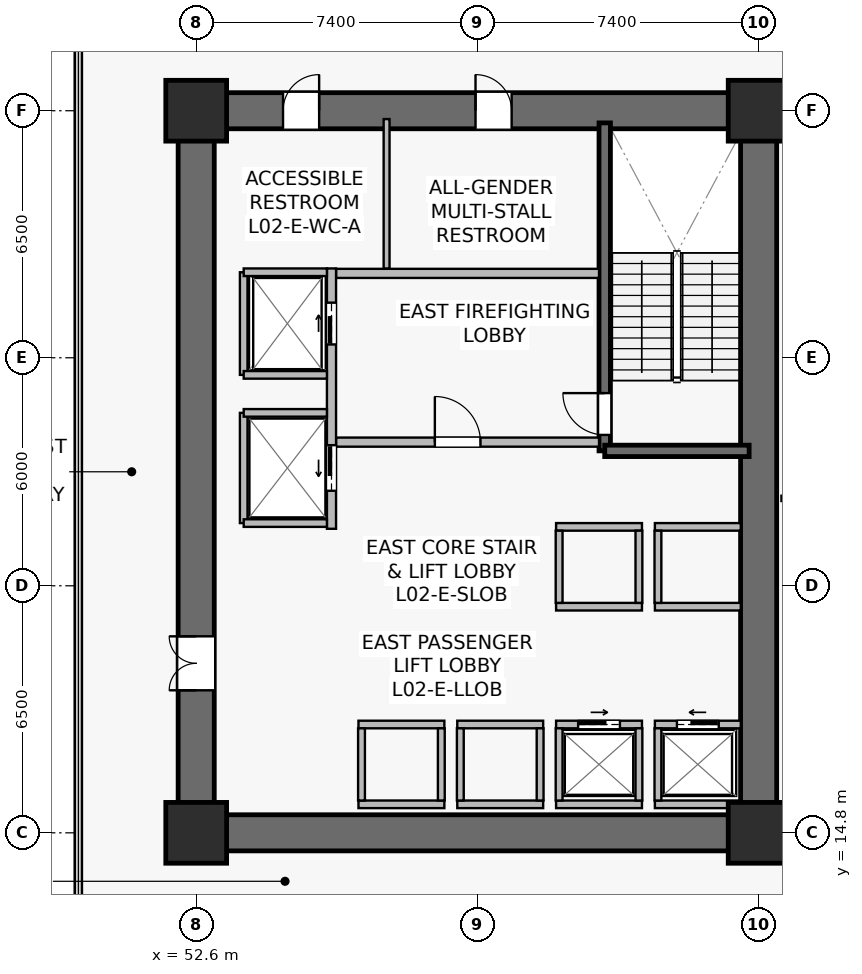
"""IFC4 building model, lengths in metres.
Left out: names, types, materials, properties, quantities, classifications, styles, units other than length and angle.
Written with IfcOpenShell. Run it as: python <this file> out.ifc"""

import sys

from ifc_helpers import new_model, si_unit, direction, frame, frame_2d, origin, origin_2d, place, context, subcontext, project, spatial, rectangle, extrude, source, transform, mapped, element, fill, save


model = new_model("IFC4")
c1 = context("Model", 3, precision=1e-05, world=origin(), true_north=direction((0.0, 1.0)))
c2 = subcontext(c1, "Body", "Model", "MODEL_VIEW")
j1 = project(units=[si_unit("LENGTHUNIT", "METRE"), si_unit("PLANEANGLEUNIT", "RADIAN")], contexts=[c1])
p1 = place(None, origin())
s1 = spatial("IfcSite", under=j1, at=p1, CompositionType="ELEMENT")
p2 = place(p1, origin())
s2 = spatial("IfcBuilding", under=s1, at=p2, CompositionType="ELEMENT")
p3 = place(p2, frame((0.0, 0.0, 5.4)))
s3 = spatial("IfcBuildingStorey", under=s2, at=p3, CompositionType="ELEMENT", Elevation=5.4)
p4 = place(p3, frame((52.125, 14.8, 0.0), z_axis=(0.0, 0.0, 1.0), x_axis=(1.0, 0.0, 0.0)))
e1 = element("IfcWall", 1, at=p4, inside=s3, PredefinedType="SHEAR", context=c2, shape_type="SweptSolid", body=[
    extrude(rectangle(XDim=15.75, YDim=0.95, at=frame_2d((7.875, 0.0))), origin(), (0.0, 0.0, 1.0), 4.45),
])
p5 = place(p3, frame((52.125, 33.8, 0.0), z_axis=(0.0, 0.0, 1.0), x_axis=(1.0, 0.0, 0.0)))
e2 = element("IfcWall", 2, at=p5, inside=s3, PredefinedType="SHEAR", context=c2, shape_type="SweptSolid", body=[
    extrude(rectangle(XDim=15.75, YDim=0.95, at=frame_2d((7.875, 0.0))), origin(), (0.0, 0.0, 1.0), 4.45),
])
p6 = place(p5, frame((7.825, 0.0, 0.0)))
e3 = element("IfcOpeningElement", 3, at=p6, cuts=e2, PredefinedType="OPENING", context=c2, shape_type="SweptSolid", body=[
    extrude(rectangle(XDim=0.95, YDim=2.15, at=frame_2d((0.475, 1.075))), frame((0.0, 0.485, 0.0), z_axis=(0.0, -1.0, 0.0), x_axis=(1.0, 0.0, 0.0)), (0.0, 0.0, 1.0), 0.97),
])
p7 = place(p5, frame((2.76, 0.0, 0.0)))
e4 = element("IfcOpeningElement", 4, at=p7, cuts=e2, PredefinedType="OPENING", context=c2, shape_type="SweptSolid", body=[
    extrude(rectangle(XDim=0.95, YDim=2.15, at=frame_2d((0.475, 1.075))), frame((0.0, 0.485, 0.0), z_axis=(0.0, -1.0, 0.0), x_axis=(1.0, 0.0, 0.0)), (0.0, 0.0, 1.0), 0.97),
])
p8 = place(p3, frame((52.6, 15.275, 0.0), z_axis=(0.0, 0.0, 1.0), x_axis=(0.0, 1.0, 0.0)))
e5 = element("IfcWall", 5, at=p8, inside=s3, PredefinedType="SHEAR", context=c2, shape_type="SweptSolid", body=[
    extrude(rectangle(XDim=18.05, YDim=0.95, at=frame_2d((9.025, 0.0))), origin(), (0.0, 0.0, 1.0), 4.45),
])
p9 = place(p8, frame((3.275, 0.0, 0.0)))
e6 = element("IfcOpeningElement", 6, at=p9, cuts=e5, PredefinedType="OPENING", context=c2, shape_type="SweptSolid", body=[
    extrude(rectangle(XDim=1.42, YDim=2.2, at=frame_2d((0.71, 1.1))), frame((0.0, 0.485, 0.0), z_axis=(0.0, -1.0, 0.0), x_axis=(1.0, 0.0, 0.0)), (0.0, 0.0, 1.0), 0.97),
])
p10 = place(p3, frame((67.4, 15.275, 0.0), z_axis=(0.0, 0.0, 1.0), x_axis=(0.0, 1.0, 0.0)))
e7 = element("IfcWall", 7, at=p10, inside=s3, PredefinedType="SHEAR", context=c2, shape_type="SweptSolid", body=[
    extrude(rectangle(XDim=18.05, YDim=0.95, at=frame_2d((9.025, 0.0))), origin(), (0.0, 0.0, 1.0), 4.45),
])
p11 = place(p3, frame((63.35, 24.85, 0.0), z_axis=(0.0, 0.0, 1.0), x_axis=(0.0, 1.0, 0.0)))
e8 = element("IfcWall", 8, at=p11, inside=s3, PredefinedType="SHEAR", context=c2, shape_type="SweptSolid", body=[
    extrude(rectangle(XDim=8.63, YDim=0.3, at=frame_2d((4.315, 0.0))), origin(), (0.0, 0.0, 1.0), 4.45),
])
p12 = place(p11, frame((0.42, 0.0, 0.0)))
e9 = element("IfcOpeningElement", 9, at=p12, cuts=e8, PredefinedType="OPENING", context=c2, shape_type="SweptSolid", body=[
    extrude(rectangle(XDim=1.1, YDim=2.15, at=frame_2d((0.55, 1.075))), frame((0.0, 0.16, 0.0), z_axis=(0.0, -1.0, 0.0), x_axis=(1.0, 0.0, 0.0)), (0.0, 0.0, 1.0), 0.32),
])
p13 = place(p3, frame((63.35, 24.85, 0.0), z_axis=(0.0, 0.0, 1.0), x_axis=(1.0, 0.0, 0.0)))
e10 = element("IfcWall", 10, at=p13, inside=s3, PredefinedType="SHEAR", context=c2, shape_type="SweptSolid", body=[
    extrude(rectangle(XDim=3.8, YDim=0.3, at=frame_2d((1.9, 0.0))), origin(), (0.0, 0.0, 1.0), 4.45),
])
m1 = source(origin(), c2, "Body", "SweptSolid", [
    extrude(rectangle(XDim=1.6, YDim=1.6, at=origin_2d()), origin(), (0.0, 0.0, 1.0), 4.8),
])
for number, where, z_axis, x_axis in (
    (11, (52.6, 14.8, 0.0), (0.0, 0.0, 1.0), (1.0, 0.0, 0.0)),
    (12, (67.4, 14.8, 0.0), (0.0, 0.0, 1.0), (1.0, 0.0, 0.0)),
    (13, (52.6, 33.8, 0.0), (0.0, 0.0, 1.0), (1.0, 0.0, 0.0)),
    (14, (67.4, 33.8, 0.0), (0.0, 0.0, 1.0), (1.0, 0.0, 0.0)),
):
    element("IfcColumn", number, at=place(p3, frame(where, z_axis=z_axis, x_axis=x_axis)), inside=s3, PredefinedType="COLUMN", context=c2, shape_type="MappedRepresentation", body=[
        mapped(m1, transform((0.0, 0.0, 0.0), scale=1.0)),
    ])
p14 = place(p3, frame((56.28, 25.08, 0.0), z_axis=(0.0, 0.0, 1.0), x_axis=(1.0, 0.0, 0.0)))
e15 = element("IfcWall", 15, at=p14, inside=s3, PredefinedType="SOLIDWALL", context=c2, shape_type="SweptSolid", body=[
    extrude(rectangle(XDim=6.92, YDim=0.24, at=frame_2d((3.46, 0.0))), origin(), (0.0, 0.0, 1.0), 3.735),
])
p15 = place(p14, frame((2.6, 0.0, 0.0)))
e16 = element("IfcOpeningElement", 16, at=p15, cuts=e15, PredefinedType="OPENING", context=c2, shape_type="SweptSolid", body=[
    extrude(rectangle(XDim=1.2, YDim=2.16, at=frame_2d((0.6, 1.08))), frame((0.0, 0.13, 0.0), z_axis=(0.0, -1.0, 0.0), x_axis=(1.0, 0.0, 0.0)), (0.0, 0.0, 1.0), 0.26),
])
p16 = place(p3, frame((56.28, 29.52, 0.0), z_axis=(0.0, 0.0, 1.0), x_axis=(1.0, 0.0, 0.0)))
e17 = element("IfcWall", 17, at=p16, inside=s3, PredefinedType="SOLIDWALL", context=c2, shape_type="SweptSolid", body=[
    extrude(rectangle(XDim=6.92, YDim=0.24, at=frame_2d((3.46, 0.0))), origin(), (0.0, 0.0, 1.0), 3.735),
])
p17 = place(p3, frame((56.16, 22.8, 0.0), z_axis=(0.0, 0.0, 1.0), x_axis=(0.0, 1.0, 0.0)))
e18 = element("IfcWall", 18, at=p17, inside=s3, PredefinedType="SOLIDWALL", context=c2, shape_type="SweptSolid", body=[
    extrude(rectangle(XDim=6.85, YDim=0.24, at=frame_2d((3.425, 0.0))), origin(), (0.0, 0.0, 1.0), 3.535),
])
p18 = place(p17, frame((4.85, 0.0, 0.0)))
e19 = element("IfcOpeningElement", 19, at=p18, cuts=e18, PredefinedType="OPENING", context=c2, shape_type="SweptSolid", body=[
    extrude(rectangle(XDim=1.1, YDim=2.22, at=frame_2d((0.55, 1.11))), frame((0.0, 0.13, 0.0), z_axis=(0.0, -1.0, 0.0), x_axis=(1.0, 0.0, 0.0)), (0.0, 0.0, 1.0), 0.26),
])
p19 = place(p17, frame((1.0, 0.0, 0.0)))
e20 = element("IfcOpeningElement", 20, at=p19, cuts=e18, PredefinedType="OPENING", context=c2, shape_type="SweptSolid", body=[
    extrude(rectangle(XDim=1.2, YDim=2.22, at=frame_2d((0.6, 1.11))), frame((0.0, 0.13, 0.0), z_axis=(0.0, -1.0, 0.0), x_axis=(1.0, 0.0, 0.0)), (0.0, 0.0, 1.0), 0.26),
])
p20 = place(p3, frame((64.67, 17.65, 0.0), z_axis=(0.0, 0.0, 1.0), x_axis=(1.0, 0.0, 0.0)))
e21 = element("IfcWall", 21, at=p20, inside=s3, PredefinedType="SOLIDWALL", context=c2, shape_type="SweptSolid", body=[
    extrude(rectangle(XDim=2.26, YDim=0.2, at=frame_2d((1.13, 0.0))), origin(), (0.0, 0.0, 1.0), 4.45),
])
p21 = place(p20, frame((0.58, 0.0, 0.0)))
e22 = element("IfcOpeningElement", 22, at=p21, cuts=e21, PredefinedType="OPENING", context=c2, shape_type="SweptSolid", body=[
    extrude(rectangle(XDim=1.1, YDim=2.22, at=frame_2d((0.55, 1.11))), frame((0.0, 0.11, 0.0), z_axis=(0.0, -1.0, 0.0), x_axis=(1.0, 0.0, 0.0)), (0.0, 0.0, 1.0), 0.22),
])
p22 = place(p3, frame((64.67, 15.55, 0.0), z_axis=(0.0, 0.0, 1.0), x_axis=(1.0, 0.0, 0.0)))
e23 = element("IfcWall", 23, at=p22, inside=s3, PredefinedType="SOLIDWALL", context=c2, shape_type="SweptSolid", body=[
    extrude(rectangle(XDim=2.26, YDim=0.2, at=frame_2d((1.13, 0.0))), origin(), (0.0, 0.0, 1.0), 4.45),
])
p23 = place(p3, frame((64.75, 15.65, 0.0), z_axis=(0.0, 0.0, 1.0), x_axis=(0.0, 1.0, 0.0)))
e24 = element("IfcWall", 24, at=p23, inside=s3, PredefinedType="SOLIDWALL", context=c2, shape_type="SweptSolid", body=[
    extrude(rectangle(XDim=1.9, YDim=0.18, at=frame_2d((0.95, 0.0))), origin(), (0.0, 0.0, 1.0), 4.45),
])
p24 = place(p3, frame((62.07, 17.65, 0.0), z_axis=(0.0, 0.0, 1.0), x_axis=(1.0, 0.0, 0.0)))
e25 = element("IfcWall", 25, at=p24, inside=s3, PredefinedType="SOLIDWALL", context=c2, shape_type="SweptSolid", body=[
    extrude(rectangle(XDim=2.26, YDim=0.2, at=frame_2d((1.13, 0.0))), origin(), (0.0, 0.0, 1.0), 4.45),
])
p25 = place(p24, frame((0.58, 0.0, 0.0)))
e26 = element("IfcOpeningElement", 26, at=p25, cuts=e25, PredefinedType="OPENING", context=c2, shape_type="SweptSolid", body=[
    extrude(rectangle(XDim=1.1, YDim=2.22, at=frame_2d((0.55, 1.11))), frame((0.0, 0.11, 0.0), z_axis=(0.0, -1.0, 0.0), x_axis=(1.0, 0.0, 0.0)), (0.0, 0.0, 1.0), 0.22),
])
p26 = place(p3, frame((62.07, 15.55, 0.0), z_axis=(0.0, 0.0, 1.0), x_axis=(1.0, 0.0, 0.0)))
e27 = element("IfcWall", 27, at=p26, inside=s3, PredefinedType="SOLIDWALL", context=c2, shape_type="SweptSolid", body=[
    extrude(rectangle(XDim=2.26, YDim=0.2, at=frame_2d((1.13, 0.0))), origin(), (0.0, 0.0, 1.0), 4.45),
])
for number, where, z_axis, x_axis in (
    (28, (62.15, 15.65, 0.0), (0.0, 0.0, 1.0), (0.0, 1.0, 0.0)),
    (29, (64.25, 15.65, 0.0), (0.0, 0.0, 1.0), (0.0, 1.0, 0.0)),
):
    element("IfcWall", number, at=place(p3, frame(where, z_axis=z_axis, x_axis=x_axis)), inside=s3, PredefinedType="SOLIDWALL", context=c2, shape_type="SweptSolid", body=[
        extrude(rectangle(XDim=1.9, YDim=0.18, at=frame_2d((0.95, 0.0))), origin(), (0.0, 0.0, 1.0), 4.45),
    ])
for number, where, z_axis, x_axis in (
    (30, (59.47, 17.65, 0.0), (0.0, 0.0, 1.0), (1.0, 0.0, 0.0)),
    (31, (59.47, 15.55, 0.0), (0.0, 0.0, 1.0), (1.0, 0.0, 0.0)),
):
    element("IfcWall", number, at=place(p3, frame(where, z_axis=z_axis, x_axis=x_axis)), inside=s3, PredefinedType="SOLIDWALL", context=c2, shape_type="SweptSolid", body=[
        extrude(rectangle(XDim=2.26, YDim=0.2, at=frame_2d((1.13, 0.0))), origin(), (0.0, 0.0, 1.0), 3.735),
    ])
for number, where, z_axis, x_axis in (
    (32, (59.55, 15.65, 0.0), (0.0, 0.0, 1.0), (0.0, 1.0, 0.0)),
    (33, (61.65, 15.65, 0.0), (0.0, 0.0, 1.0), (0.0, 1.0, 0.0)),
):
    element("IfcWall", number, at=place(p3, frame(where, z_axis=z_axis, x_axis=x_axis)), inside=s3, PredefinedType="SOLIDWALL", context=c2, shape_type="SweptSolid", body=[
        extrude(rectangle(XDim=1.9, YDim=0.18, at=frame_2d((0.95, 0.0))), origin(), (0.0, 0.0, 1.0), 4.45),
    ])
for number, where, z_axis, x_axis in (
    (34, (56.87, 17.65, 0.0), (0.0, 0.0, 1.0), (1.0, 0.0, 0.0)),
    (35, (56.87, 15.55, 0.0), (0.0, 0.0, 1.0), (1.0, 0.0, 0.0)),
):
    element("IfcWall", number, at=place(p3, frame(where, z_axis=z_axis, x_axis=x_axis)), inside=s3, PredefinedType="SOLIDWALL", context=c2, shape_type="SweptSolid", body=[
        extrude(rectangle(XDim=2.26, YDim=0.2, at=frame_2d((1.13, 0.0))), origin(), (0.0, 0.0, 1.0), 4.45),
    ])
for number, where, z_axis, x_axis in (
    (36, (56.95, 15.65, 0.0), (0.0, 0.0, 1.0), (0.0, 1.0, 0.0)),
    (37, (59.05, 15.65, 0.0), (0.0, 0.0, 1.0), (0.0, 1.0, 0.0)),
):
    element("IfcWall", number, at=place(p3, frame(where, z_axis=z_axis, x_axis=x_axis)), inside=s3, PredefinedType="SOLIDWALL", context=c2, shape_type="SweptSolid", body=[
        extrude(rectangle(XDim=1.9, YDim=0.18, at=frame_2d((0.95, 0.0))), origin(), (0.0, 0.0, 1.0), 4.45),
    ])
for number, where, z_axis, x_axis in (
    (38, (64.67, 20.75, 0.0), (0.0, 0.0, 1.0), (1.0, 0.0, 0.0)),
    (39, (64.67, 22.85, 0.0), (0.0, 0.0, 1.0), (1.0, 0.0, 0.0)),
):
    element("IfcWall", number, at=place(p3, frame(where, z_axis=z_axis, x_axis=x_axis)), inside=s3, PredefinedType="SOLIDWALL", context=c2, shape_type="SweptSolid", body=[
        extrude(rectangle(XDim=2.26, YDim=0.2, at=frame_2d((1.13, 0.0))), origin(), (0.0, 0.0, 1.0), 4.45),
    ])
p27 = place(p3, frame((64.75, 20.85, 0.0), z_axis=(0.0, 0.0, 1.0), x_axis=(0.0, 1.0, 0.0)))
e40 = element("IfcWall", 40, at=p27, inside=s3, PredefinedType="SOLIDWALL", context=c2, shape_type="SweptSolid", body=[
    extrude(rectangle(XDim=1.9, YDim=0.18, at=frame_2d((0.95, 0.0))), origin(), (0.0, 0.0, 1.0), 4.45),
])
for number, where, z_axis, x_axis in (
    (41, (62.07, 20.75, 0.0), (0.0, 0.0, 1.0), (1.0, 0.0, 0.0)),
    (42, (62.07, 22.85, 0.0), (0.0, 0.0, 1.0), (1.0, 0.0, 0.0)),
):
    element("IfcWall", number, at=place(p3, frame(where, z_axis=z_axis, x_axis=x_axis)), inside=s3, PredefinedType="SOLIDWALL", context=c2, shape_type="SweptSolid", body=[
        extrude(rectangle(XDim=2.26, YDim=0.2, at=frame_2d((1.13, 0.0))), origin(), (0.0, 0.0, 1.0), 4.45),
    ])
for number, where, z_axis, x_axis in (
    (43, (62.15, 20.85, 0.0), (0.0, 0.0, 1.0), (0.0, 1.0, 0.0)),
    (44, (64.25, 20.85, 0.0), (0.0, 0.0, 1.0), (0.0, 1.0, 0.0)),
):
    element("IfcWall", number, at=place(p3, frame(where, z_axis=z_axis, x_axis=x_axis)), inside=s3, PredefinedType="SOLIDWALL", context=c2, shape_type="SweptSolid", body=[
        extrude(rectangle(XDim=1.9, YDim=0.18, at=frame_2d((0.95, 0.0))), origin(), (0.0, 0.0, 1.0), 4.45),
    ])
p28 = place(p3, frame((53.85, 26.85, 0.0), z_axis=(0.0, 0.0, 1.0), x_axis=(0.0, 1.0, 0.0)))
e45 = element("IfcWall", 45, at=p28, inside=s3, PredefinedType="SOLIDWALL", context=c2, shape_type="SweptSolid", body=[
    extrude(rectangle(XDim=2.7, YDim=0.2, at=frame_2d((1.35, 0.0))), origin(), (0.0, 0.0, 1.0), 4.45),
])
p29 = place(p3, frame((53.85, 29.55, 0.0), z_axis=(0.0, 0.0, 1.0), x_axis=(1.0, 0.0, 0.0)))
e46 = element("IfcWall", 46, at=p29, inside=s3, PredefinedType="SOLIDWALL", context=c2, shape_type="SweptSolid", body=[
    extrude(rectangle(XDim=2.19, YDim=0.2, at=frame_2d((1.095, 0.0))), origin(), (0.0, 0.0, 1.0), 4.45),
])
p30 = place(p3, frame((53.85, 26.85, 0.0), z_axis=(0.0, 0.0, 1.0), x_axis=(1.0, 0.0, 0.0)))
e47 = element("IfcWall", 47, at=p30, inside=s3, PredefinedType="SOLIDWALL", context=c2, shape_type="SweptSolid", body=[
    extrude(rectangle(XDim=2.19, YDim=0.2, at=frame_2d((1.095, 0.0))), origin(), (0.0, 0.0, 1.0), 3.847),
])
p31 = place(p3, frame((53.85, 22.95, 0.0), z_axis=(0.0, 0.0, 1.0), x_axis=(0.0, 1.0, 0.0)))
e48 = element("IfcWall", 48, at=p31, inside=s3, PredefinedType="SOLIDWALL", context=c2, shape_type="SweptSolid", body=[
    extrude(rectangle(XDim=2.9, YDim=0.2, at=frame_2d((1.45, 0.0))), origin(), (0.0, 0.0, 1.0), 3.535),
])
for number, where, z_axis, x_axis in (
    (49, (53.85, 25.85, 0.0), (0.0, 0.0, 1.0), (1.0, 0.0, 0.0)),
    (50, (53.85, 22.95, 0.0), (0.0, 0.0, 1.0), (1.0, 0.0, 0.0)),
):
    element("IfcWall", number, at=place(p3, frame(where, z_axis=z_axis, x_axis=x_axis)), inside=s3, PredefinedType="SOLIDWALL", context=c2, shape_type="SweptSolid", body=[
        extrude(rectangle(XDim=2.19, YDim=0.2, at=frame_2d((1.095, 0.0))), origin(), (0.0, 0.0, 1.0), 4.45),
    ])
p32 = place(p3, frame((57.61, 29.65, 0.0), z_axis=(0.0, 0.0, 1.0), x_axis=(0.0, 1.0, 0.0)))
e51 = element("IfcWall", 51, at=p32, inside=s3, PredefinedType="PLUMBINGWALL", context=c2, shape_type="SweptSolid", body=[
    extrude(rectangle(XDim=3.93, YDim=0.155, at=frame_2d((1.965, 0.0))), origin(), (0.0, 0.0, 1.0), 4.45),
])
m2 = source(origin(), c2, "Body", "SweptSolid", [
    extrude(rectangle(XDim=1.1, YDim=2.15, at=frame_2d((0.55, 1.075))), frame((0.0, 0.025, 0.0), z_axis=(0.0, -1.0, 0.0), x_axis=(1.0, 0.0, 0.0)), (0.0, 0.0, 1.0), 0.05),
])
p33 = place(p12, origin())
e52 = element("IfcDoor", 52, at=p33, inside=s3, OperationType="SINGLE_SWING_RIGHT", PredefinedType="DOOR", context=c2, shape_type="MappedRepresentation", body=[
    mapped(m2, transform((0.0, 0.0, 0.0), scale=1.0)),
])
fill(e9, e52)
m3 = source(origin(), c2, "Body", "SweptSolid", [
    extrude(rectangle(XDim=1.2, YDim=2.16, at=frame_2d((0.6, 1.08))), frame((0.0, 0.025, 0.0), z_axis=(0.0, -1.0, 0.0), x_axis=(1.0, 0.0, 0.0)), (0.0, 0.0, 1.0), 0.05),
])
p34 = place(p15, origin())
e53 = element("IfcDoor", 53, at=p34, inside=s3, OperationType="SINGLE_SWING_LEFT", PredefinedType="DOOR", context=c2, shape_type="MappedRepresentation", body=[
    mapped(m3, transform((0.0, 0.0, 0.0), scale=1.0)),
])
fill(e16, e53)
m4 = source(origin(), c2, "Body", "SweptSolid", [
    extrude(rectangle(XDim=1.1, YDim=2.22, at=frame_2d((0.55, 1.11))), frame((0.0, 0.025, 0.0), z_axis=(0.0, -1.0, 0.0), x_axis=(1.0, 0.0, 0.0)), (0.0, 0.0, 1.0), 0.05),
])
p35 = place(p21, origin())
e54 = element("IfcDoor", 54, at=p35, inside=s3, OperationType="SLIDING_TO_LEFT", PredefinedType="USERDEFINED", context=c2, shape_type="MappedRepresentation", body=[
    mapped(m4, transform((0.0, 0.0, 0.0), scale=1.0)),
])
fill(e22, e54)
p36 = place(p25, origin())
e55 = element("IfcDoor", 55, at=p36, inside=s3, OperationType="SLIDING_TO_RIGHT", PredefinedType="USERDEFINED", context=c2, shape_type="MappedRepresentation", body=[
    mapped(m4, transform((0.0, 0.0, 0.0), scale=1.0)),
])
fill(e26, e55)
p37 = place(p18, origin())
e56 = element("IfcDoor", 56, at=p37, inside=s3, OperationType="SLIDING_TO_RIGHT", PredefinedType="USERDEFINED", context=c2, shape_type="MappedRepresentation", body=[
    mapped(m4, transform((0.0, 0.0, 0.0), scale=1.0)),
])
fill(e19, e56)
m5 = source(origin(), c2, "Body", "SweptSolid", [
    extrude(rectangle(XDim=1.2, YDim=2.22, at=frame_2d((0.6, 1.11))), frame((0.0, 0.025, 0.0), z_axis=(0.0, -1.0, 0.0), x_axis=(1.0, 0.0, 0.0)), (0.0, 0.0, 1.0), 0.05),
])
p38 = place(p19, origin())
e57 = element("IfcDoor", 57, at=p38, inside=s3, OperationType="SLIDING_TO_LEFT", PredefinedType="USERDEFINED", context=c2, shape_type="MappedRepresentation", body=[
    mapped(m5, transform((0.0, 0.0, 0.0), scale=1.0)),
])
fill(e20, e57)
m6 = source(origin(), c2, "Body", "SweptSolid", [
    extrude(rectangle(XDim=1.42, YDim=2.2, at=frame_2d((0.71, 1.1))), frame((0.0, 0.025, 0.0), z_axis=(0.0, -1.0, 0.0), x_axis=(1.0, 0.0, 0.0)), (0.0, 0.0, 1.0), 0.05),
])
p39 = place(p9, origin())
e58 = element("IfcDoor", 58, at=p39, inside=s3, OperationType="DOUBLE_DOOR_SINGLE_SWING", PredefinedType="DOOR", context=c2, shape_type="MappedRepresentation", body=[
    mapped(m6, transform((0.0, 0.0, 0.0), scale=1.0)),
])
fill(e6, e58)
m7 = source(origin(), c2, "Body", "SweptSolid", [
    extrude(rectangle(XDim=0.95, YDim=2.15, at=frame_2d((0.475, 1.075))), frame((0.0, 0.025, 0.0), z_axis=(0.0, -1.0, 0.0), x_axis=(1.0, 0.0, 0.0)), (0.0, 0.0, 1.0), 0.05),
])
p40 = place(p6, origin())
e59 = element("IfcDoor", 59, at=p40, inside=s3, OperationType="SINGLE_SWING_LEFT", PredefinedType="DOOR", context=c2, shape_type="MappedRepresentation", body=[
    mapped(m7, transform((0.0, 0.0, 0.0), scale=1.0)),
])
fill(e3, e59)
p41 = place(p7, origin())
e60 = element("IfcDoor", 60, at=p41, inside=s3, OperationType="SINGLE_SWING_RIGHT", PredefinedType="DOOR", context=c2, shape_type="MappedRepresentation", body=[
    mapped(m7, transform((0.0, 0.0, 0.0), scale=1.0)),
])
fill(e4, e60)
save(model, sys.argv[1])
